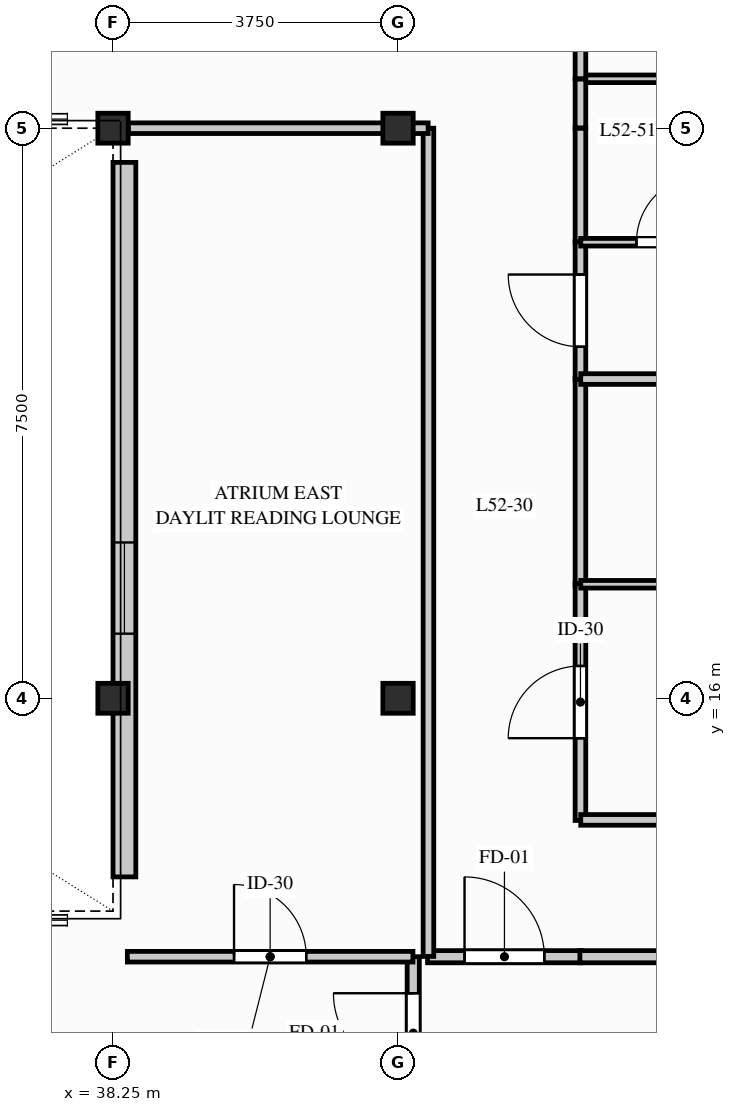
"""IFC4 building model, lengths in metres.
Left out: names, types, materials, properties, quantities, classifications, styles, units other than length and angle.
Written with IfcOpenShell. Run it as: python <this file> out.ifc"""

import sys

from ifc_helpers import new_model, si_unit, direction, frame, frame_2d, origin, origin_2d, place, context, subcontext, project, spatial, rectangle, i_section, extrude, element, fill, save


model = new_model("IFC4")
c1 = context("Model", 3, precision=1e-05, world=origin(), true_north=direction((0.0, 1.0)))
c2 = subcontext(c1, "Body", "Model", "MODEL_VIEW")
j1 = project(units=[si_unit("LENGTHUNIT", "METRE"), si_unit("PLANEANGLEUNIT", "RADIAN")], contexts=[c1])
p1 = place(None, origin())
s1 = spatial("IfcSite", under=j1, at=p1, CompositionType="ELEMENT")
p2 = place(p1, origin())
s2 = spatial("IfcBuilding", under=s1, at=p2, CompositionType="ELEMENT")
p3 = place(p2, frame((0.0, 0.0, 172.8)))
s3 = spatial("IfcBuildingStorey", under=s2, at=p3, CompositionType="ELEMENT", Elevation=172.8)
for number, where, z_axis, x_axis in (
    (1, (38.25, 16.0, 0.0), (0.0, 0.0, 1.0), (1.0, 0.0, 0.0)),
    (2, (38.25, 23.5, 0.0), (0.0, 0.0, 1.0), (1.0, 0.0, 0.0)),
    (3, (42.0, 16.0, 0.0), (0.0, 0.0, 1.0), (1.0, 0.0, 0.0)),
    (4, (42.0, 23.5, 0.0), (0.0, 0.0, 1.0), (1.0, 0.0, 0.0)),
):
    element("IfcColumn", number, at=place(p3, frame(where, z_axis=z_axis, x_axis=x_axis)), inside=s3, PredefinedType="COLUMN", context=c2, shape_type="SweptSolid", body=[
        extrude(i_section(OverallWidth=0.399, OverallDepth=0.394, WebThickness=0.023, FlangeThickness=0.037, FilletRadius=0.015, at=origin_2d()), origin(), (0.0, 0.0, 1.0), 3.1),
    ])
p4 = place(p3, frame((38.4, 13.65, 0.0), z_axis=(0.0, 0.0, 1.0), x_axis=(0.0, 1.0, 0.0)))
e5 = element("IfcWall", 5, at=p4, inside=s3, PredefinedType="STANDARD", context=c2, shape_type="SweptSolid", body=[
    extrude(rectangle(XDim=9.4, YDim=0.3, at=frame_2d((4.7, 0.0))), origin(), (0.0, 0.0, 1.0), 2.253),
])
p5 = place(p4, frame((3.2, 0.0, 0.433)))
e6 = element("IfcOpeningElement", 6, at=p5, cuts=e5, PredefinedType="OPENING", context=c2, shape_type="SweptSolid", body=[
    extrude(rectangle(XDim=1.2, YDim=1.6, at=frame_2d((0.6, 0.8))), frame((0.0, 0.16, 0.0), z_axis=(0.0, -1.0, 0.0), x_axis=(1.0, 0.0, 0.0)), (0.0, 0.0, 1.0), 0.32),
])
p6 = place(p3, frame((42.2, 10.589, 0.0), z_axis=(0.0, 0.0, 1.0), x_axis=(0.0, 1.0, 0.0)))
e7 = element("IfcWall", 7, at=p6, inside=s3, PredefinedType="PARTITIONING", context=c2, shape_type="SweptSolid", body=[
    extrude(rectangle(XDim=2.011, YDim=0.16, at=frame_2d((1.006, 0.0))), origin(), (0.0, 0.0, 1.0), 2.253),
])
p7 = place(p6, frame((0.481, 0.0, 0.0)))
e8 = element("IfcOpeningElement", 8, at=p7, cuts=e7, PredefinedType="OPENING", context=c2, shape_type="SweptSolid", body=[
    extrude(rectangle(XDim=1.05, YDim=2.06, at=frame_2d((0.525, 1.03))), frame((0.0, 0.09, 0.0), z_axis=(0.0, -1.0, 0.0), x_axis=(1.0, 0.0, 0.0)), (0.0, 0.0, 1.0), 0.18),
])
p8 = place(p3, frame((42.389, 12.6, 0.0), z_axis=(0.0, 0.0, 1.0), x_axis=(1.0, 0.0, 0.0)))
e9 = element("IfcWall", 9, at=p8, inside=s3, PredefinedType="PARTITIONING", context=c2, shape_type="SweptSolid", body=[
    extrude(rectangle(XDim=2.023, YDim=0.16, at=frame_2d((1.011, 0.0))), origin(), (0.0, 0.0, 1.0), 2.89),
])
p9 = place(p8, frame((0.486, 0.0, 0.0)))
e10 = element("IfcOpeningElement", 10, at=p9, cuts=e9, PredefinedType="OPENING", context=c2, shape_type="SweptSolid", body=[
    extrude(rectangle(XDim=1.05, YDim=2.06, at=frame_2d((0.525, 1.03))), frame((0.0, 0.09, 0.0), z_axis=(0.0, -1.0, 0.0), x_axis=(1.0, 0.0, 0.0)), (0.0, 0.0, 1.0), 0.18),
])
p10 = place(p3, frame((44.393, 12.6, 0.0), z_axis=(0.0, 0.0, 1.0), x_axis=(1.0, 0.0, 0.0)))
e11 = element("IfcWall", 11, at=p10, inside=s3, PredefinedType="PARTITIONING", context=c2, shape_type="SweptSolid", body=[
    extrude(rectangle(XDim=3.607, YDim=0.16, at=frame_2d((1.804, 0.0))), origin(), (0.0, 0.0, 1.0), 2.253),
])
p11 = place(p10, frame((1.279, 0.0, 0.0)))
e12 = element("IfcOpeningElement", 12, at=p11, cuts=e11, PredefinedType="OPENING", context=c2, shape_type="SweptSolid", body=[
    extrude(rectangle(XDim=1.05, YDim=2.06, at=frame_2d((0.525, 1.03))), frame((0.0, 0.09, 0.0), z_axis=(0.0, -1.0, 0.0), x_axis=(1.0, 0.0, 0.0)), (0.0, 0.0, 1.0), 0.18),
])
p12 = place(p3, frame((38.439, 12.6, 0.0), z_axis=(0.0, 0.0, 1.0), x_axis=(1.0, 0.0, 0.0)))
e13 = element("IfcWall", 13, at=p12, inside=s3, PredefinedType="PARTITIONING", context=c2, shape_type="SweptSolid", body=[
    extrude(rectangle(XDim=3.757, YDim=0.14, at=frame_2d((1.879, 0.0))), origin(), (0.0, 0.0, 1.0), 2.253),
])
p13 = place(p12, frame((1.404, 0.0, 0.0)))
e14 = element("IfcOpeningElement", 14, at=p13, cuts=e13, PredefinedType="OPENING", context=c2, shape_type="SweptSolid", body=[
    extrude(rectangle(XDim=0.95, YDim=2.05, at=frame_2d((0.475, 1.025))), frame((0.0, 0.08, 0.0), z_axis=(0.0, -1.0, 0.0), x_axis=(1.0, 0.0, 0.0)), (0.0, 0.0, 1.0), 0.16),
])
p14 = place(p3, frame((44.4, 17.489, 0.0), z_axis=(0.0, 0.0, 1.0), x_axis=(0.0, 1.0, 0.0)))
e15 = element("IfcWall", 15, at=p14, inside=s3, PredefinedType="PARTITIONING", context=c2, shape_type="SweptSolid", body=[
    extrude(rectangle(XDim=2.722, YDim=0.14, at=frame_2d((1.361, 0.0))), origin(), (0.0, 0.0, 1.0), 2.562),
])
p15 = place(p3, frame((44.4, 14.393, 0.0), z_axis=(0.0, 0.0, 1.0), x_axis=(0.0, 1.0, 0.0)))
e16 = element("IfcWall", 16, at=p15, inside=s3, PredefinedType="PARTITIONING", context=c2, shape_type="SweptSolid", body=[
    extrude(rectangle(XDim=3.115, YDim=0.14, at=frame_2d((1.557, 0.0))), origin(), (0.0, 0.0, 1.0), 2.253),
])
p16 = place(p15, frame((1.082, 0.0, 0.0)))
e17 = element("IfcOpeningElement", 17, at=p16, cuts=e16, PredefinedType="OPENING", context=c2, shape_type="SweptSolid", body=[
    extrude(rectangle(XDim=0.95, YDim=2.05, at=frame_2d((0.475, 1.025))), frame((0.0, 0.08, 0.0), z_axis=(0.0, -1.0, 0.0), x_axis=(1.0, 0.0, 0.0)), (0.0, 0.0, 1.0), 0.16),
])
p17 = place(p3, frame((44.4, 21.989, 0.0), z_axis=(0.0, 0.0, 1.0), x_axis=(0.0, 1.0, 0.0)))
e18 = element("IfcWall", 18, at=p17, inside=s3, PredefinedType="PARTITIONING", context=c2, shape_type="SweptSolid", body=[
    extrude(rectangle(XDim=1.511, YDim=0.14, at=frame_2d((0.756, 0.0))), origin(), (0.0, 0.0, 1.0), 2.253),
])
p18 = place(p3, frame((44.4, 20.193, 0.0), z_axis=(0.0, 0.0, 1.0), x_axis=(0.0, 1.0, 0.0)))
e19 = element("IfcWall", 19, at=p18, inside=s3, PredefinedType="PARTITIONING", context=c2, shape_type="SweptSolid", body=[
    extrude(rectangle(XDim=1.815, YDim=0.14, at=frame_2d((0.907, 0.0))), origin(), (0.0, 0.0, 1.0), 2.89),
])
p19 = place(p18, frame((0.432, 0.0, 0.0)))
e20 = element("IfcOpeningElement", 20, at=p19, cuts=e19, PredefinedType="OPENING", context=c2, shape_type="SweptSolid", body=[
    extrude(rectangle(XDim=0.95, YDim=2.05, at=frame_2d((0.475, 1.025))), frame((0.0, 0.08, 0.0), z_axis=(0.0, -1.0, 0.0), x_axis=(1.0, 0.0, 0.0)), (0.0, 0.0, 1.0), 0.16),
])
p20 = place(p3, frame((42.4, 12.604, 0.0), z_axis=(0.0, 0.0, 1.0), x_axis=(0.0, 1.0, 0.0)))
e21 = element("IfcWall", 21, at=p20, inside=s3, PredefinedType="PARTITIONING", context=c2, shape_type="SweptSolid", body=[
    extrude(rectangle(XDim=10.896, YDim=0.14, at=frame_2d((5.448, 0.0))), origin(), (0.0, 0.0, 1.0), 2.253),
])
p21 = place(p3, frame((44.404, 14.4, 0.0), z_axis=(0.0, 0.0, 1.0), x_axis=(1.0, 0.0, 0.0)))
e22 = element("IfcWall", 22, at=p21, inside=s3, PredefinedType="PARTITIONING", context=c2, shape_type="SweptSolid", body=[
    extrude(rectangle(XDim=9.153, YDim=0.14, at=frame_2d((4.577, 0.0))), origin(), (0.0, 0.0, 1.0), 2.253),
])
p22 = place(p3, frame((44.404, 17.5, 0.0), z_axis=(0.0, 0.0, 1.0), x_axis=(1.0, 0.0, 0.0)))
e23 = element("IfcWall", 23, at=p22, inside=s3, PredefinedType="PARTITIONING", context=c2, shape_type="SweptSolid", body=[
    extrude(rectangle(XDim=11.7, YDim=0.1, at=frame_2d((5.85, 0.0))), origin(), (0.0, 0.0, 1.0), 2.253),
])
p23 = place(p22, frame((5.41, 0.0, 0.0)))
e24 = element("IfcOpeningElement", 24, at=p23, cuts=e23, PredefinedType="OPENING", context=c2, shape_type="SweptSolid", body=[
    extrude(rectangle(XDim=0.88, YDim=2.04, at=frame_2d((0.44, 1.02))), frame((0.0, 0.06, 0.0), z_axis=(0.0, -1.0, 0.0), x_axis=(1.0, 0.0, 0.0)), (0.0, 0.0, 1.0), 0.12),
])
p24 = place(p3, frame((44.404, 20.2, 0.0), z_axis=(0.0, 0.0, 1.0), x_axis=(1.0, 0.0, 0.0)))
e25 = element("IfcWall", 25, at=p24, inside=s3, PredefinedType="PARTITIONING", context=c2, shape_type="SweptSolid", body=[
    extrude(rectangle(XDim=10.803, YDim=0.14, at=frame_2d((5.402, 0.0))), origin(), (0.0, 0.0, 1.0), 2.253),
])
p25 = place(p3, frame((44.4, 24.15, 0.0), z_axis=(0.0, 0.0, 1.0), x_axis=(1.0, 0.0, 0.0)))
e26 = element("IfcWall", 26, at=p25, inside=s3, PredefinedType="PARTITIONING", context=c2, shape_type="SweptSolid", body=[
    extrude(rectangle(XDim=2.35, YDim=0.1, at=frame_2d((1.175, 0.0))), origin(), (0.0, 0.0, 1.0), 2.89),
])
p26 = place(p3, frame((44.4, 24.15, 0.0), z_axis=(0.0, 0.0, 1.0), x_axis=(0.0, 1.0, 0.0)))
e27 = element("IfcWall", 27, at=p26, inside=s3, PredefinedType="PARTITIONING", context=c2, shape_type="SweptSolid", body=[
    extrude(rectangle(XDim=0.961, YDim=0.14, at=frame_2d((0.481, 0.0))), origin(), (0.0, 0.0, 1.0), 2.89),
])
p27 = place(p3, frame((44.404, 22.0, 0.0), z_axis=(0.0, 0.0, 1.0), x_axis=(1.0, 0.0, 0.0)))
e28 = element("IfcWall", 28, at=p27, inside=s3, PredefinedType="PARTITIONING", context=c2, shape_type="SweptSolid", body=[
    extrude(rectangle(XDim=2.346, YDim=0.1, at=frame_2d((1.173, 0.0))), origin(), (0.0, 0.0, 1.0), 2.89),
])
p28 = place(p27, frame((0.733, 0.0, 0.0)))
e29 = element("IfcOpeningElement", 29, at=p28, cuts=e28, PredefinedType="OPENING", context=c2, shape_type="SweptSolid", body=[
    extrude(rectangle(XDim=0.88, YDim=2.04, at=frame_2d((0.44, 1.02))), frame((0.0, 0.06, 0.0), z_axis=(0.0, -1.0, 0.0), x_axis=(1.0, 0.0, 0.0)), (0.0, 0.0, 1.0), 0.12),
])
p29 = place(p3, frame((44.4, 23.504, 0.0), z_axis=(0.0, 0.0, 1.0), x_axis=(0.0, 1.0, 0.0)))
e30 = element("IfcWall", 30, at=p29, inside=s3, PredefinedType="PARTITIONING", context=c2, shape_type="SweptSolid", body=[
    extrude(rectangle(XDim=0.642, YDim=0.14, at=frame_2d((0.321, 0.0))), origin(), (0.0, 0.0, 1.0), 2.253),
])
p30 = place(p3, frame((38.45, 23.5, 0.0), z_axis=(0.0, 0.0, 1.0), x_axis=(1.0, 0.0, 0.0)))
e31 = element("IfcWall", 31, at=p30, inside=s3, PredefinedType="PARTITIONING", context=c2, shape_type="SweptSolid", body=[
    extrude(rectangle(XDim=3.946, YDim=0.14, at=frame_2d((1.973, 0.0))), origin(), (0.0, 0.0, 1.0), 2.253),
])
p31 = place(p5, origin())
e32 = element("IfcWindow", 32, at=p31, inside=s3, PartitioningType="SINGLE_PANEL", PredefinedType="WINDOW", context=c2, shape_type="SweptSolid", body=[
    extrude(rectangle(XDim=1.2, YDim=1.6, at=frame_2d((0.6, 0.8))), frame((0.0, 0.03, 0.0), z_axis=(0.0, -1.0, 0.0), x_axis=(1.0, 0.0, 0.0)), (0.0, 0.0, 1.0), 0.06),
])
fill(e6, e32)
p32 = place(p7, origin())
e33 = element("IfcDoor", 33, at=p32, inside=s3, OperationType="SINGLE_SWING_RIGHT", PredefinedType="DOOR", context=c2, shape_type="SweptSolid", body=[
    extrude(rectangle(XDim=1.05, YDim=2.06, at=frame_2d((0.525, 1.03))), frame((0.0, 0.025, 0.0), z_axis=(0.0, -1.0, 0.0), x_axis=(1.0, 0.0, 0.0)), (0.0, 0.0, 1.0), 0.05),
])
fill(e8, e33)
p33 = place(p9, origin())
e34 = element("IfcDoor", 34, at=p33, inside=s3, OperationType="SINGLE_SWING_LEFT", PredefinedType="DOOR", context=c2, shape_type="SweptSolid", body=[
    extrude(rectangle(XDim=1.05, YDim=2.06, at=frame_2d((0.525, 1.03))), frame((0.0, 0.025, 0.0), z_axis=(0.0, -1.0, 0.0), x_axis=(1.0, 0.0, 0.0)), (0.0, 0.0, 1.0), 0.05),
])
fill(e10, e34)
p34 = place(p13, origin())
e35 = element("IfcDoor", 35, at=p34, inside=s3, OperationType="SINGLE_SWING_LEFT", PredefinedType="DOOR", context=c2, shape_type="SweptSolid", body=[
    extrude(rectangle(XDim=0.95, YDim=2.05, at=frame_2d((0.475, 1.025))), frame((0.0, 0.025, 0.0), z_axis=(0.0, -1.0, 0.0), x_axis=(1.0, 0.0, 0.0)), (0.0, 0.0, 1.0), 0.05),
])
fill(e14, e35)
p35 = place(p16, origin())
e36 = element("IfcDoor", 36, at=p35, inside=s3, OperationType="SINGLE_SWING_LEFT", PredefinedType="DOOR", context=c2, shape_type="SweptSolid", body=[
    extrude(rectangle(XDim=0.95, YDim=2.05, at=frame_2d((0.475, 1.025))), frame((0.0, 0.025, 0.0), z_axis=(0.0, -1.0, 0.0), x_axis=(1.0, 0.0, 0.0)), (0.0, 0.0, 1.0), 0.05),
])
fill(e17, e36)
p36 = place(p19, origin())
e37 = element("IfcDoor", 37, at=p36, inside=s3, OperationType="SINGLE_SWING_RIGHT", PredefinedType="DOOR", context=c2, shape_type="SweptSolid", body=[
    extrude(rectangle(XDim=0.95, YDim=2.05, at=frame_2d((0.475, 1.025))), frame((0.0, 0.025, 0.0), z_axis=(0.0, -1.0, 0.0), x_axis=(1.0, 0.0, 0.0)), (0.0, 0.0, 1.0), 0.05),
])
fill(e20, e37)
p37 = place(p28, origin())
e38 = element("IfcDoor", 38, at=p37, inside=s3, OperationType="SINGLE_SWING_RIGHT", PredefinedType="DOOR", context=c2, shape_type="SweptSolid", body=[
    extrude(rectangle(XDim=0.88, YDim=2.04, at=frame_2d((0.44, 1.02))), frame((0.0, 0.025, 0.0), z_axis=(0.0, -1.0, 0.0), x_axis=(1.0, 0.0, 0.0)), (0.0, 0.0, 1.0), 0.05),
])
fill(e29, e38)
save(model, sys.argv[1])
